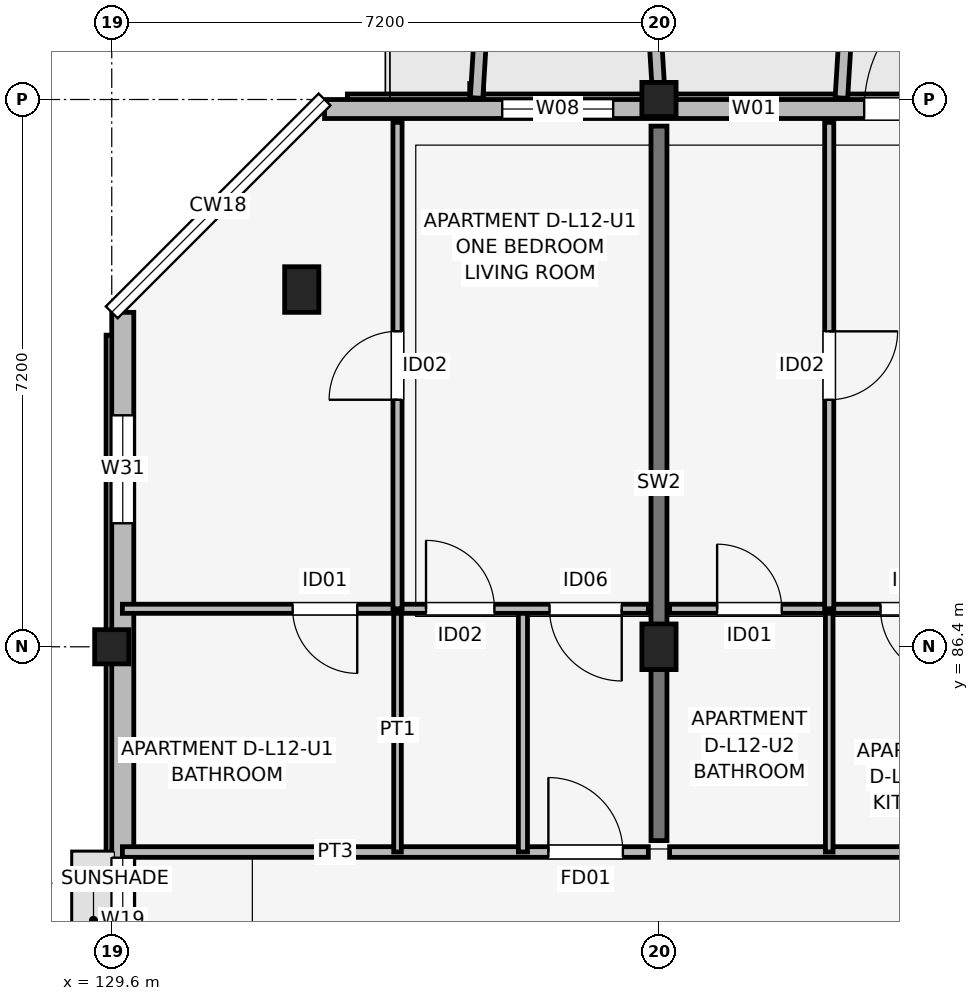
"""IFC4 building model, lengths in metres.
Left out: names, types, materials, properties, quantities, classifications, styles, units other than length and angle.
Written with IfcOpenShell. Run it as: python <this file> out.ifc"""

import sys

from ifc_helpers import new_model, si_unit, direction, frame, frame_2d, origin, origin_2d, place, context, subcontext, project, spatial, rectangle, extrude, element, fill, save


model = new_model("IFC4")
c1 = context("Model", 3, precision=1e-05, world=origin(), true_north=direction((0.0, 1.0)))
c2 = subcontext(c1, "Body", "Model", "MODEL_VIEW")
j1 = project(units=[si_unit("LENGTHUNIT", "METRE"), si_unit("PLANEANGLEUNIT", "RADIAN")], contexts=[c1])
p1 = place(None, origin())
s1 = spatial("IfcSite", under=j1, at=p1, CompositionType="ELEMENT")
p2 = place(p1, origin())
s2 = spatial("IfcBuilding", under=s1, at=p2, CompositionType="ELEMENT")
p3 = place(p2, frame((0.0, 0.0, 40.2)))
s3 = spatial("IfcBuildingStorey", under=s2, at=p3, CompositionType="ELEMENT", Elevation=40.2)
p4 = place(p3, frame((129.6, 86.4, 0.0), z_axis=(0.0, 0.0, 1.0), x_axis=(1.0, 0.0, 0.0)))
e1 = element("IfcColumn", 1, at=p4, inside=s3, PredefinedType="COLUMN", context=c2, shape_type="SweptSolid", body=[
    extrude(rectangle(XDim=0.45, YDim=0.45, at=origin_2d()), origin(), (0.0, 0.0, 1.0), 3.15),
])
for number, where, z_axis, x_axis in (
    (2, (132.1, 91.1, 0.0), (0.0, 0.0, 1.0), (1.0, 0.0, 0.0)),
    (3, (136.8, 86.4, 0.0), (0.0, 0.0, 1.0), (1.0, 0.0, 0.0)),
):
    element("IfcColumn", number, at=place(p3, frame(where, z_axis=z_axis, x_axis=x_axis)), inside=s3, PredefinedType="COLUMN", context=c2, shape_type="SweptSolid", body=[
        extrude(rectangle(XDim=0.45, YDim=0.6, at=origin_2d()), origin(), (0.0, 0.0, 1.0), 3.15),
    ])
p5 = place(p3, frame((136.8, 93.6, 0.0), z_axis=(0.0, 0.0, 1.0), x_axis=(1.0, 0.0, 0.0)))
e4 = element("IfcColumn", 4, at=p5, inside=s3, PredefinedType="COLUMN", context=c2, shape_type="SweptSolid", body=[
    extrude(rectangle(XDim=0.45, YDim=0.45, at=origin_2d()), origin(), (0.0, 0.0, 1.0), 3.15),
])
p6 = place(p3, frame((136.8, 83.85, 0.0), z_axis=(0.0, 0.0, 1.0), x_axis=(0.0, 1.0, 0.0)))
e5 = element("IfcWall", 5, at=p6, inside=s3, PredefinedType="SHEAR", context=c2, shape_type="SweptSolid", body=[
    extrude(rectangle(XDim=9.4, YDim=0.21, at=frame_2d((4.7, 0.0))), origin(), (0.0, 0.0, 1.0), 3.15),
])
p7 = place(p3, frame((162.8, 93.475, 0.0), z_axis=(0.0, 0.0, 1.0), x_axis=(-1.0, 0.0, 0.0)))
e6 = element("IfcWall", 6, at=p7, inside=s3, PredefinedType="SOLIDWALL", context=c2, shape_type="SweptSolid", body=[
    extrude(rectangle(XDim=30.4, YDim=0.25, at=frame_2d((15.2, 0.0))), origin(), (0.0, 0.0, 1.0), 2.48),
])
p8 = place(p7, frame((23.3, 0.0, 0.0), z_axis=(0.0, 0.0, 1.0), x_axis=(-1.0, 0.0, 0.0)))
e7 = element("IfcOpeningElement", 7, at=p8, cuts=e6, PredefinedType="OPENING", context=c2, shape_type="SweptSolid", body=[
    extrude(rectangle(XDim=1.8, YDim=2.15, at=frame_2d((0.9, 1.075))), frame((0.0, 0.135, 0.0), z_axis=(0.0, -1.0, 0.0), x_axis=(1.0, 0.0, 0.0)), (0.0, 0.0, 1.0), 0.27),
])
p9 = place(p7, frame((8.825, 0.0, 0.0), z_axis=(0.0, 0.0, 1.0), x_axis=(-1.0, 0.0, 0.0)))
e8 = element("IfcOpeningElement", 8, at=p9, cuts=e6, PredefinedType="OPENING", context=c2, shape_type="SweptSolid", body=[
    extrude(rectangle(XDim=1.65, YDim=2.15, at=frame_2d((0.825, 1.075))), frame((0.0, 0.135, 0.0), z_axis=(0.0, -1.0, 0.0), x_axis=(1.0, 0.0, 0.0)), (0.0, 0.0, 1.0), 0.27),
])
p10 = place(p7, frame((26.603, 0.0, 0.75)))
e9 = element("IfcOpeningElement", 9, at=p10, cuts=e6, PredefinedType="OPENING", context=c2, shape_type="SweptSolid", body=[
    extrude(rectangle(XDim=1.46, YDim=1.55, at=frame_2d((0.73, 0.775))), frame((0.0, 0.135, 0.0), z_axis=(0.0, -1.0, 0.0), x_axis=(1.0, 0.0, 0.0)), (0.0, 0.0, 1.0), 0.27),
])
p11 = place(p7, frame((24.452, 0.0, 0.75)))
e10 = element("IfcOpeningElement", 10, at=p11, cuts=e6, PredefinedType="OPENING", context=c2, shape_type="SweptSolid", body=[
    extrude(rectangle(XDim=0.6, YDim=1.25, at=frame_2d((0.3, 0.625))), frame((0.0, 0.135, 0.0), z_axis=(0.0, -1.0, 0.0), x_axis=(1.0, 0.0, 0.0)), (0.0, 0.0, 1.0), 0.27),
])
p12 = place(p7, frame((14.2, 0.0, 0.7)))
e11 = element("IfcOpeningElement", 11, at=p12, cuts=e6, PredefinedType="OPENING", context=c2, shape_type="SweptSolid", body=[
    extrude(rectangle(XDim=2.0, YDim=1.65, at=frame_2d((1.0, 0.825))), frame((0.0, 0.135, 0.0), z_axis=(0.0, -1.0, 0.0), x_axis=(1.0, 0.0, 0.0)), (0.0, 0.0, 1.0), 0.27),
])
p13 = place(p7, frame((9.927, 0.0, 0.75)))
e12 = element("IfcOpeningElement", 12, at=p13, cuts=e6, PredefinedType="OPENING", context=c2, shape_type="SweptSolid", body=[
    extrude(rectangle(XDim=0.85, YDim=1.4, at=frame_2d((0.425, 0.7))), frame((0.0, 0.135, 0.0), z_axis=(0.0, -1.0, 0.0), x_axis=(1.0, 0.0, 0.0)), (0.0, 0.0, 1.0), 0.27),
])
p14 = place(p7, frame((2.137, 0.0, 0.7)))
e13 = element("IfcOpeningElement", 13, at=p14, cuts=e6, PredefinedType="OPENING", context=c2, shape_type="SweptSolid", body=[
    extrude(rectangle(XDim=1.86, YDim=1.6, at=frame_2d((0.93, 0.8))), frame((0.0, 0.135, 0.0), z_axis=(0.0, -1.0, 0.0), x_axis=(1.0, 0.0, 0.0)), (0.0, 0.0, 1.0), 0.27),
])
p15 = place(p3, frame((129.745, 90.8, 0.0), z_axis=(0.0, 0.0, 1.0), x_axis=(0.0, -1.0, 0.0)))
e14 = element("IfcWall", 14, at=p15, inside=s3, PredefinedType="SOLIDWALL", context=c2, shape_type="SweptSolid", body=[
    extrude(rectangle(XDim=16.0, YDim=0.29, at=frame_2d((8.0, 0.0))), origin(), (0.0, 0.0, 1.0), 2.51),
])
p16 = place(p15, frame((7.175, 0.0, 1.05)))
e15 = element("IfcOpeningElement", 15, at=p16, cuts=e14, PredefinedType="OPENING", context=c2, shape_type="SweptSolid", body=[
    extrude(rectangle(XDim=1.65, YDim=1.15, at=frame_2d((0.825, 0.575))), frame((0.0, 0.155, 0.0), z_axis=(0.0, -1.0, 0.0), x_axis=(1.0, 0.0, 0.0)), (0.0, 0.0, 1.0), 0.31),
])
p17 = place(p15, frame((1.355, 0.0, 0.75)))
e16 = element("IfcOpeningElement", 16, at=p17, cuts=e14, PredefinedType="OPENING", context=c2, shape_type="SweptSolid", body=[
    extrude(rectangle(XDim=1.42, YDim=1.6, at=frame_2d((0.71, 0.8))), frame((0.0, 0.155, 0.0), z_axis=(0.0, -1.0, 0.0), x_axis=(1.0, 0.0, 0.0)), (0.0, 0.0, 1.0), 0.31),
])
for number, where, z_axis, x_axis in (
    (17, (134.4, 93.62, 0.0), (0.0, 0.0, 1.0), (0.061, 0.998, 0.0)),
    (18, (136.8, 93.62, 0.0), (0.0, 0.0, 1.0), (-0.061, 0.998, 0.0)),
):
    element("IfcWall", number, at=place(p3, frame(where, z_axis=z_axis, x_axis=x_axis)), inside=s3, PredefinedType="ELEMENTEDWALL", context=c2, shape_type="SweptSolid", body=[
        extrude(rectangle(XDim=1.964, YDim=0.165, at=frame_2d((0.982, 0.0))), origin(), (0.0, 0.0, 1.0), 2.95),
    ])
p18 = place(p3, frame((139.2, 93.62, 0.0), z_axis=(0.0, 0.0, 1.0), x_axis=(0.061170732449, 0.998127317276, 0.0)))
e19 = element("IfcWall", 19, at=p18, inside=s3, PredefinedType="ELEMENTEDWALL", context=c2, shape_type="SweptSolid", body=[
    extrude(rectangle(XDim=1.964, YDim=0.165, at=frame_2d((0.982, 0.0))), origin(), (0.0, 0.0, 1.0), 2.58),
])
p19 = place(p3, frame((129.74, 83.7, 0.0), z_axis=(0.0, 0.0, 1.0), x_axis=(1.0, 0.0, 0.0)))
e20 = element("IfcWall", 20, at=p19, inside=s3, PredefinedType="PARTITIONING", context=c2, shape_type="SweptSolid", body=[
    extrude(rectangle(XDim=6.92, YDim=0.14, at=frame_2d((3.46, 0.0))), origin(), (0.0, 0.0, 1.0), 2.38),
])
p20 = place(p19, frame((5.605, 0.0, 0.0)))
e21 = element("IfcOpeningElement", 21, at=p20, cuts=e20, PredefinedType="OPENING", context=c2, shape_type="SweptSolid", body=[
    extrude(rectangle(XDim=0.98, YDim=2.1, at=frame_2d((0.49, 1.05))), frame((0.0, 0.08, 0.0), z_axis=(0.0, -1.0, 0.0), x_axis=(1.0, 0.0, 0.0)), (0.0, 0.0, 1.0), 0.16),
])
p21 = place(p3, frame((133.36, 83.7, 0.0), z_axis=(0.0, 0.0, 1.0), x_axis=(0.0, 1.0, 0.0)))
e22 = element("IfcWall", 22, at=p21, inside=s3, PredefinedType="PARTITIONING", context=c2, shape_type="SweptSolid", body=[
    extrude(rectangle(XDim=3.2, YDim=0.1, at=frame_2d((1.6, 0.0))), origin(), (0.0, 0.0, 1.0), 2.38),
])
p22 = place(p3, frame((135.01, 83.7, 0.0), z_axis=(0.0, 0.0, 1.0), x_axis=(0.0, 1.0, 0.0)))
e23 = element("IfcWall", 23, at=p22, inside=s3, PredefinedType="PARTITIONING", context=c2, shape_type="SweptSolid", body=[
    extrude(rectangle(XDim=3.2, YDim=0.12, at=frame_2d((1.6, 0.0))), origin(), (0.0, 0.0, 1.0), 2.38),
])
p23 = place(p3, frame((129.74, 86.9, 0.0), z_axis=(0.0, 0.0, 1.0), x_axis=(1.0, 0.0, 0.0)))
e24 = element("IfcWall", 24, at=p23, inside=s3, PredefinedType="PARTITIONING", context=c2, shape_type="SweptSolid", body=[
    extrude(rectangle(XDim=6.92, YDim=0.12, at=frame_2d((3.46, 0.0))), origin(), (0.0, 0.0, 1.0), 2.38),
])
p24 = place(p23, frame((3.09, 0.0, 0.0), z_axis=(0.0, 0.0, 1.0), x_axis=(-1.0, 0.0, 0.0)))
e25 = element("IfcOpeningElement", 25, at=p24, cuts=e24, PredefinedType="OPENING", context=c2, shape_type="SweptSolid", body=[
    extrude(rectangle(XDim=0.85, YDim=2.08, at=frame_2d((0.425, 1.04))), frame((0.0, 0.07, 0.0), z_axis=(0.0, -1.0, 0.0), x_axis=(1.0, 0.0, 0.0)), (0.0, 0.0, 1.0), 0.14),
])
p25 = place(p23, frame((3.995, 0.0, 0.0)))
e26 = element("IfcOpeningElement", 26, at=p25, cuts=e24, PredefinedType="OPENING", context=c2, shape_type="SweptSolid", body=[
    extrude(rectangle(XDim=0.9, YDim=2.08, at=frame_2d((0.45, 1.04))), frame((0.0, 0.07, 0.0), z_axis=(0.0, -1.0, 0.0), x_axis=(1.0, 0.0, 0.0)), (0.0, 0.0, 1.0), 0.14),
])
p26 = place(p23, frame((6.57, 0.0, 0.0), z_axis=(0.0, 0.0, 1.0), x_axis=(-1.0, 0.0, 0.0)))
e27 = element("IfcOpeningElement", 27, at=p26, cuts=e24, PredefinedType="OPENING", context=c2, shape_type="SweptSolid", body=[
    extrude(rectangle(XDim=0.95, YDim=2.08, at=frame_2d((0.475, 1.04))), frame((0.0, 0.07, 0.0), z_axis=(0.0, -1.0, 0.0), x_axis=(1.0, 0.0, 0.0)), (0.0, 0.0, 1.0), 0.14),
])
p27 = place(p3, frame((133.36, 86.9, 0.0), z_axis=(0.0, 0.0, 1.0), x_axis=(0.0, 1.0, 0.0)))
e28 = element("IfcWall", 28, at=p27, inside=s3, PredefinedType="PARTITIONING", context=c2, shape_type="SweptSolid", body=[
    extrude(rectangle(XDim=6.4, YDim=0.12, at=frame_2d((3.2, 0.0))), origin(), (0.0, 0.0, 1.0), 2.38),
])
p28 = place(p27, frame((2.75, 0.0, 0.0)))
e29 = element("IfcOpeningElement", 29, at=p28, cuts=e28, PredefinedType="OPENING", context=c2, shape_type="SweptSolid", body=[
    extrude(rectangle(XDim=0.9, YDim=2.08, at=frame_2d((0.45, 1.04))), frame((0.0, 0.07, 0.0), z_axis=(0.0, -1.0, 0.0), x_axis=(1.0, 0.0, 0.0)), (0.0, 0.0, 1.0), 0.14),
])
p29 = place(p3, frame((136.94, 83.7, 0.0), z_axis=(0.0, 0.0, 1.0), x_axis=(1.0, 0.0, 0.0)))
e30 = element("IfcWall", 30, at=p29, inside=s3, PredefinedType="PARTITIONING", context=c2, shape_type="SweptSolid", body=[
    extrude(rectangle(XDim=6.92, YDim=0.14, at=frame_2d((3.46, 0.0))), origin(), (0.0, 0.0, 1.0), 2.38),
])
p30 = place(p29, frame((6.125, 0.0, 0.0), z_axis=(0.0, 0.0, 1.0), x_axis=(-1.0, 0.0, 0.0)))
e31 = element("IfcOpeningElement", 31, at=p30, cuts=e30, PredefinedType="OPENING", context=c2, shape_type="SweptSolid", body=[
    extrude(rectangle(XDim=0.98, YDim=2.1, at=frame_2d((0.49, 1.05))), frame((0.0, 0.08, 0.0), z_axis=(0.0, -1.0, 0.0), x_axis=(1.0, 0.0, 0.0)), (0.0, 0.0, 1.0), 0.16),
])
p31 = place(p3, frame((139.04, 83.7, 0.0), z_axis=(0.0, 0.0, 1.0), x_axis=(0.0, 1.0, 0.0)))
e32 = element("IfcWall", 32, at=p31, inside=s3, PredefinedType="PARTITIONING", context=c2, shape_type="SweptSolid", body=[
    extrude(rectangle(XDim=3.2, YDim=0.1, at=frame_2d((1.6, 0.0))), origin(), (0.0, 0.0, 1.0), 2.38),
])
p32 = place(p3, frame((136.94, 86.9, 0.0), z_axis=(0.0, 0.0, 1.0), x_axis=(1.0, 0.0, 0.0)))
e33 = element("IfcWall", 33, at=p32, inside=s3, PredefinedType="PARTITIONING", context=c2, shape_type="SweptSolid", body=[
    extrude(rectangle(XDim=6.92, YDim=0.12, at=frame_2d((3.46, 0.0))), origin(), (0.0, 0.0, 1.0), 2.38),
])
p33 = place(p32, frame((0.625, 0.0, 0.0)))
e34 = element("IfcOpeningElement", 34, at=p33, cuts=e33, PredefinedType="OPENING", context=c2, shape_type="SweptSolid", body=[
    extrude(rectangle(XDim=0.85, YDim=2.08, at=frame_2d((0.425, 1.04))), frame((0.0, 0.07, 0.0), z_axis=(0.0, -1.0, 0.0), x_axis=(1.0, 0.0, 0.0)), (0.0, 0.0, 1.0), 0.14),
])
p34 = place(p32, frame((3.675, 0.0, 0.0), z_axis=(0.0, 0.0, 1.0), x_axis=(-1.0, 0.0, 0.0)))
e35 = element("IfcOpeningElement", 35, at=p34, cuts=e33, PredefinedType="OPENING", context=c2, shape_type="SweptSolid", body=[
    extrude(rectangle(XDim=0.9, YDim=2.08, at=frame_2d((0.45, 1.04))), frame((0.0, 0.07, 0.0), z_axis=(0.0, -1.0, 0.0), x_axis=(1.0, 0.0, 0.0)), (0.0, 0.0, 1.0), 0.14),
])
p35 = place(p32, frame((5.16, 0.0, 0.0)))
e36 = element("IfcOpeningElement", 36, at=p35, cuts=e33, PredefinedType="OPENING", context=c2, shape_type="SweptSolid", body=[
    extrude(rectangle(XDim=0.95, YDim=2.08, at=frame_2d((0.475, 1.04))), frame((0.0, 0.07, 0.0), z_axis=(0.0, -1.0, 0.0), x_axis=(1.0, 0.0, 0.0)), (0.0, 0.0, 1.0), 0.14),
])
p36 = place(p3, frame((139.04, 86.9, 0.0), z_axis=(0.0, 0.0, 1.0), x_axis=(0.0, 1.0, 0.0)))
e37 = element("IfcWall", 37, at=p36, inside=s3, PredefinedType="PARTITIONING", context=c2, shape_type="SweptSolid", body=[
    extrude(rectangle(XDim=6.4, YDim=0.12, at=frame_2d((3.2, 0.0))), origin(), (0.0, 0.0, 1.0), 2.38),
])
p37 = place(p36, frame((3.65, 0.0, 0.0), z_axis=(0.0, 0.0, 1.0), x_axis=(-1.0, 0.0, 0.0)))
e38 = element("IfcOpeningElement", 38, at=p37, cuts=e37, PredefinedType="OPENING", context=c2, shape_type="SweptSolid", body=[
    extrude(rectangle(XDim=0.9, YDim=2.08, at=frame_2d((0.45, 1.04))), frame((0.0, 0.07, 0.0), z_axis=(0.0, -1.0, 0.0), x_axis=(1.0, 0.0, 0.0)), (0.0, 0.0, 1.0), 0.14),
])
p38 = place(p8, origin())
e39 = element("IfcDoor", 39, at=p38, inside=s3, OperationType="SINGLE_SWING_LEFT", PredefinedType="DOOR", context=c2, shape_type="SweptSolid", body=[
    extrude(rectangle(XDim=1.8, YDim=2.15, at=frame_2d((0.9, 1.075))), frame((0.0, 0.025, 0.0), z_axis=(0.0, -1.0, 0.0), x_axis=(1.0, 0.0, 0.0)), (0.0, 0.0, 1.0), 0.05),
])
fill(e7, e39)
p39 = place(p10, origin())
e40 = element("IfcWindow", 40, at=p39, inside=s3, PartitioningType="SINGLE_PANEL", PredefinedType="WINDOW", context=c2, shape_type="SweptSolid", body=[
    extrude(rectangle(XDim=1.46, YDim=1.55, at=frame_2d((0.73, 0.775))), frame((0.0, 0.03, 0.0), z_axis=(0.0, -1.0, 0.0), x_axis=(1.0, 0.0, 0.0)), (0.0, 0.0, 1.0), 0.06),
])
fill(e9, e40)
p40 = place(p11, origin())
e41 = element("IfcWindow", 41, at=p40, inside=s3, PartitioningType="SINGLE_PANEL", PredefinedType="WINDOW", context=c2, shape_type="SweptSolid", body=[
    extrude(rectangle(XDim=0.6, YDim=1.25, at=frame_2d((0.3, 0.625))), frame((0.0, 0.03, 0.0), z_axis=(0.0, -1.0, 0.0), x_axis=(1.0, 0.0, 0.0)), (0.0, 0.0, 1.0), 0.06),
])
fill(e10, e41)
p41 = place(p16, origin())
e42 = element("IfcWindow", 42, at=p41, inside=s3, PartitioningType="SINGLE_PANEL", PredefinedType="WINDOW", context=c2, shape_type="SweptSolid", body=[
    extrude(rectangle(XDim=1.65, YDim=1.15, at=frame_2d((0.825, 0.575))), frame((0.0, 0.03, 0.0), z_axis=(0.0, -1.0, 0.0), x_axis=(1.0, 0.0, 0.0)), (0.0, 0.0, 1.0), 0.06),
])
fill(e15, e42)
p42 = place(p17, origin())
e43 = element("IfcWindow", 43, at=p42, inside=s3, PartitioningType="SINGLE_PANEL", PredefinedType="WINDOW", context=c2, shape_type="SweptSolid", body=[
    extrude(rectangle(XDim=1.42, YDim=1.6, at=frame_2d((0.71, 0.8))), frame((0.0, 0.03, 0.0), z_axis=(0.0, -1.0, 0.0), x_axis=(1.0, 0.0, 0.0)), (0.0, 0.0, 1.0), 0.06),
])
fill(e16, e43)
p43 = place(p20, origin())
e44 = element("IfcDoor", 44, at=p43, inside=s3, OperationType="SINGLE_SWING_LEFT", PredefinedType="DOOR", context=c2, shape_type="SweptSolid", body=[
    extrude(rectangle(XDim=0.98, YDim=2.1, at=frame_2d((0.49, 1.05))), frame((0.0, 0.025, 0.0), z_axis=(0.0, -1.0, 0.0), x_axis=(1.0, 0.0, 0.0)), (0.0, 0.0, 1.0), 0.05),
])
fill(e21, e44)
p44 = place(p24, origin())
e45 = element("IfcDoor", 45, at=p44, inside=s3, OperationType="SINGLE_SWING_RIGHT", PredefinedType="DOOR", context=c2, shape_type="SweptSolid", body=[
    extrude(rectangle(XDim=0.85, YDim=2.08, at=frame_2d((0.425, 1.04))), frame((0.0, 0.025, 0.0), z_axis=(0.0, -1.0, 0.0), x_axis=(1.0, 0.0, 0.0)), (0.0, 0.0, 1.0), 0.05),
])
fill(e25, e45)
p45 = place(p25, origin())
e46 = element("IfcDoor", 46, at=p45, inside=s3, OperationType="SINGLE_SWING_LEFT", PredefinedType="DOOR", context=c2, shape_type="SweptSolid", body=[
    extrude(rectangle(XDim=0.9, YDim=2.08, at=frame_2d((0.45, 1.04))), frame((0.0, 0.025, 0.0), z_axis=(0.0, -1.0, 0.0), x_axis=(1.0, 0.0, 0.0)), (0.0, 0.0, 1.0), 0.05),
])
fill(e26, e46)
p46 = place(p26, origin())
e47 = element("IfcDoor", 47, at=p46, inside=s3, OperationType="SINGLE_SWING_RIGHT", PredefinedType="DOOR", context=c2, shape_type="SweptSolid", body=[
    extrude(rectangle(XDim=0.95, YDim=2.08, at=frame_2d((0.475, 1.04))), frame((0.0, 0.025, 0.0), z_axis=(0.0, -1.0, 0.0), x_axis=(1.0, 0.0, 0.0)), (0.0, 0.0, 1.0), 0.05),
])
fill(e27, e47)
p47 = place(p28, origin())
e48 = element("IfcDoor", 48, at=p47, inside=s3, OperationType="SINGLE_SWING_LEFT", PredefinedType="DOOR", context=c2, shape_type="SweptSolid", body=[
    extrude(rectangle(XDim=0.9, YDim=2.08, at=frame_2d((0.45, 1.04))), frame((0.0, 0.025, 0.0), z_axis=(0.0, -1.0, 0.0), x_axis=(1.0, 0.0, 0.0)), (0.0, 0.0, 1.0), 0.05),
])
fill(e29, e48)
p48 = place(p33, origin())
e49 = element("IfcDoor", 49, at=p48, inside=s3, OperationType="SINGLE_SWING_LEFT", PredefinedType="DOOR", context=c2, shape_type="SweptSolid", body=[
    extrude(rectangle(XDim=0.85, YDim=2.08, at=frame_2d((0.425, 1.04))), frame((0.0, 0.025, 0.0), z_axis=(0.0, -1.0, 0.0), x_axis=(1.0, 0.0, 0.0)), (0.0, 0.0, 1.0), 0.05),
])
fill(e34, e49)
p49 = place(p34, origin())
e50 = element("IfcDoor", 50, at=p49, inside=s3, OperationType="SINGLE_SWING_RIGHT", PredefinedType="DOOR", context=c2, shape_type="SweptSolid", body=[
    extrude(rectangle(XDim=0.9, YDim=2.08, at=frame_2d((0.45, 1.04))), frame((0.0, 0.025, 0.0), z_axis=(0.0, -1.0, 0.0), x_axis=(1.0, 0.0, 0.0)), (0.0, 0.0, 1.0), 0.05),
])
fill(e35, e50)
p50 = place(p37, origin())
e51 = element("IfcDoor", 51, at=p50, inside=s3, OperationType="SINGLE_SWING_RIGHT", PredefinedType="DOOR", context=c2, shape_type="SweptSolid", body=[
    extrude(rectangle(XDim=0.9, YDim=2.08, at=frame_2d((0.45, 1.04))), frame((0.0, 0.025, 0.0), z_axis=(0.0, -1.0, 0.0), x_axis=(1.0, 0.0, 0.0)), (0.0, 0.0, 1.0), 0.05),
])
fill(e38, e51)
save(model, sys.argv[1])
